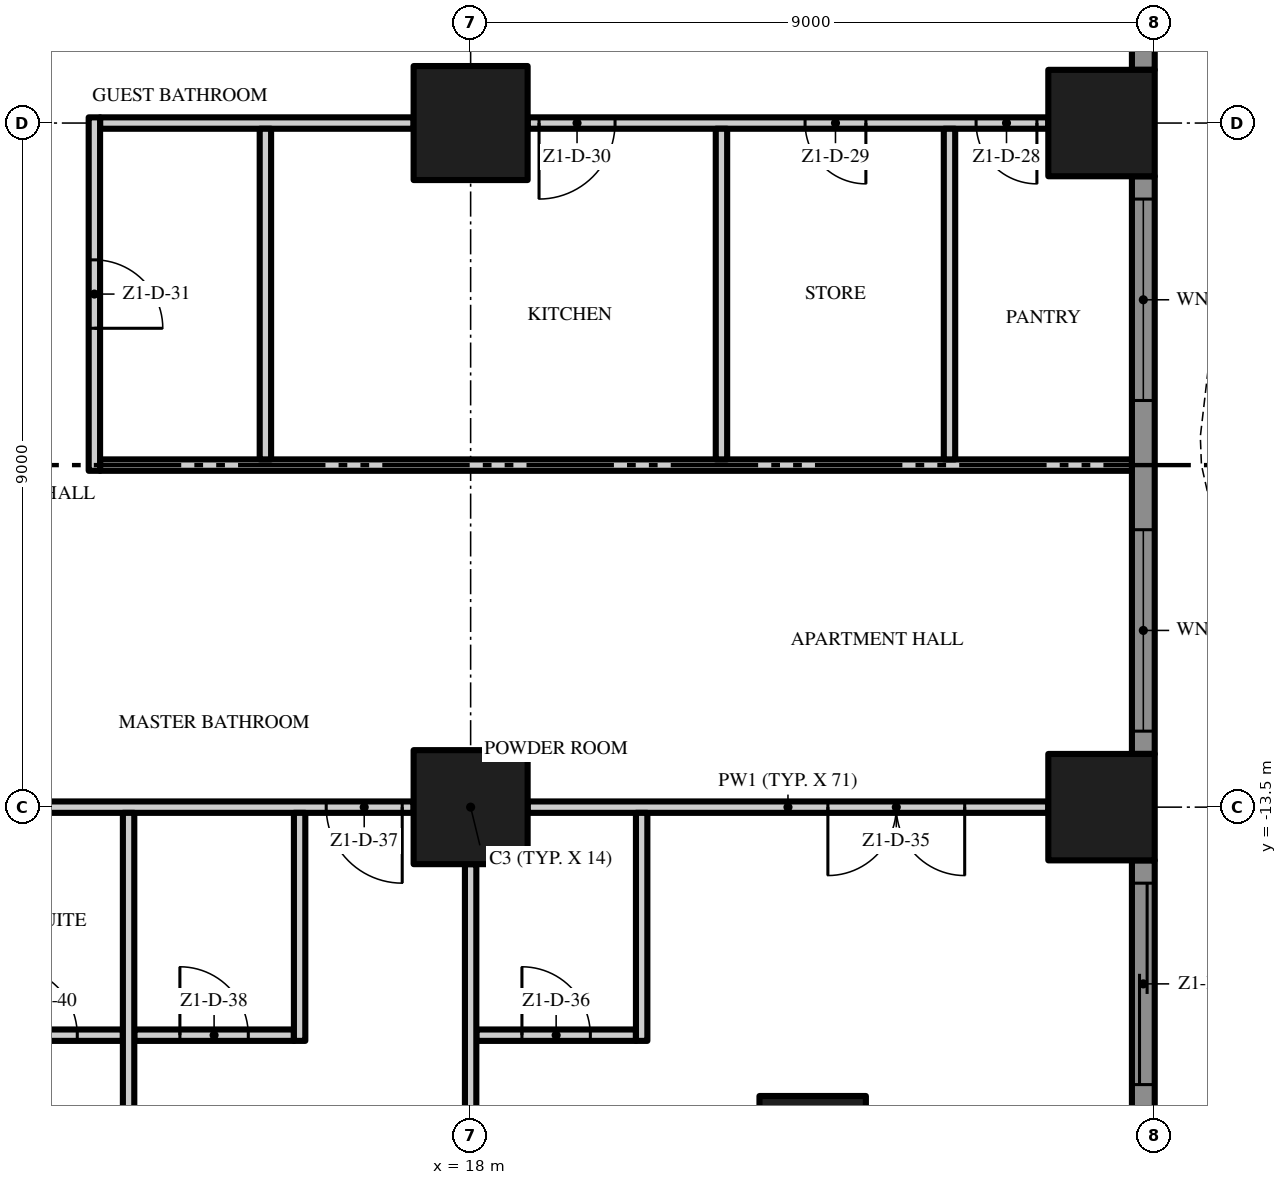
"""IFC4 building model, lengths in metres.
Left out: names, types, materials, properties, quantities, classifications, styles, units other than length and angle.
Written with IfcOpenShell. Run it as: python <this file> out.ifc"""

import sys

from ifc_helpers import new_model, si_unit, direction, frame, frame_2d, origin, origin_2d, place, context, subcontext, project, spatial, polyline, rectangle, outline, extrude, element, fill, save


model = new_model("IFC4")
c1 = context("Model", 3, precision=1e-05, world=origin(), true_north=direction((0.0, 1.0)))
c2 = subcontext(c1, "Body", "Model", "MODEL_VIEW")
j1 = project(units=[si_unit("LENGTHUNIT", "METRE"), si_unit("PLANEANGLEUNIT", "RADIAN")], contexts=[c1])
p1 = place(None, origin())
s1 = spatial("IfcSite", under=j1, at=p1, CompositionType="ELEMENT")
p2 = place(p1, origin())
s2 = spatial("IfcBuilding", under=s1, at=p2, CompositionType="ELEMENT")
p3 = place(p2, frame((0.0, 0.0, 49.2)))
s3 = spatial("IfcBuildingStorey", under=s2, at=p3, CompositionType="ELEMENT", Elevation=49.2)
for number, where, z_axis, x_axis in (
    (1, (18.0, -13.5, 0.0), (0.0, 0.0, 1.0), (1.0, 0.0, 0.0)),
    (2, (18.0, -4.5, 0.0), (0.0, 0.0, 1.0), (1.0, 0.0, 0.0)),
):
    element("IfcColumn", number, at=place(p3, frame(where, z_axis=z_axis, x_axis=x_axis)), inside=s3, PredefinedType="COLUMN", context=c2, shape_type="SweptSolid", body=[
        extrude(rectangle(XDim=1.5, YDim=1.5, at=origin_2d()), origin(), (0.0, 0.0, 1.0), 3.5),
    ])
for number, where, z_axis, x_axis in (
    (3, (26.3, -13.5, 0.0), (0.0, 0.0, 1.0), (1.0, 0.0, 0.0)),
    (4, (22.5, -18.0, 0.0), (0.0, 0.0, 1.0), (1.0, 0.0, 0.0)),
    (5, (26.3, -4.5, 0.0), (0.0, 0.0, 1.0), (1.0, 0.0, 0.0)),
):
    element("IfcColumn", number, at=place(p3, frame(where, z_axis=z_axis, x_axis=x_axis)), inside=s3, PredefinedType="COLUMN", context=c2, shape_type="SweptSolid", body=[
        extrude(rectangle(XDim=1.4, YDim=1.4, at=origin_2d()), origin(), (0.0, 0.0, 1.0), 3.5),
    ])
p4 = place(p3, frame((26.85, -14.2, 0.0), z_axis=(0.0, 0.0, 1.0), x_axis=(0.0, -1.0, 0.0)))
e6 = element("IfcWall", 6, at=p4, inside=s3, PredefinedType="SOLIDWALL", context=c2, shape_type="SweptSolid", body=[
    extrude(rectangle(XDim=3.5, YDim=0.3, at=frame_2d((1.75, 0.0))), origin(), (0.0, 0.0, 1.0), 3.5),
])
p5 = place(p4, frame((0.3, 0.0, 0.0)))
e7 = element("IfcOpeningElement", 7, at=p5, cuts=e6, PredefinedType="OPENING", context=c2, shape_type="SweptSolid", body=[
    extrude(rectangle(XDim=2.65, YDim=2.4, at=frame_2d((1.325, 1.2))), frame((0.0, 0.16, 0.0), z_axis=(0.0, -1.0, 0.0), x_axis=(1.0, 0.0, 0.0)), (0.0, 0.0, 1.0), 0.32),
])
p6 = place(p3, frame((26.85, -5.2, 0.0), z_axis=(0.0, 0.0, 1.0), x_axis=(0.0, -1.0, 0.0)))
e8 = element("IfcWall", 8, at=p6, inside=s3, PredefinedType="SOLIDWALL", context=c2, shape_type="SweptSolid", body=[
    extrude(rectangle(XDim=7.6, YDim=0.3, at=frame_2d((3.8, 0.0))), origin(), (0.0, 0.0, 1.0), 3.5),
])
p7 = place(p6, frame((4.65, 0.0, 0.45)))
e9 = element("IfcOpeningElement", 9, at=p7, cuts=e8, PredefinedType="OPENING", context=c2, shape_type="SweptSolid", body=[
    extrude(rectangle(XDim=2.65, YDim=2.65, at=frame_2d((1.325, 1.325))), frame((0.0, 0.16, 0.0), z_axis=(0.0, -1.0, 0.0), x_axis=(1.0, 0.0, 0.0)), (0.0, 0.0, 1.0), 0.32),
])
p8 = place(p6, frame((0.3, 0.0, 0.45)))
e10 = element("IfcOpeningElement", 10, at=p8, cuts=e8, PredefinedType="OPENING", context=c2, shape_type="SweptSolid", body=[
    extrude(rectangle(XDim=2.65, YDim=2.65, at=frame_2d((1.325, 1.325))), frame((0.0, 0.16, 0.0), z_axis=(0.0, -1.0, 0.0), x_axis=(1.0, 0.0, 0.0)), (0.0, 0.0, 1.0), 0.32),
])
p9 = place(p3, frame((26.85, 3.8, 0.0), z_axis=(0.0, 0.0, 1.0), x_axis=(0.0, -1.0, 0.0)))
e11 = element("IfcWall", 11, at=p9, inside=s3, PredefinedType="SOLIDWALL", context=c2, shape_type="SweptSolid", body=[
    extrude(rectangle(XDim=7.6, YDim=0.3, at=frame_2d((3.8, 0.0))), origin(), (0.0, 0.0, 1.0), 3.5),
])
p10 = place(p9, frame((4.65, 0.0, 0.0)))
e12 = element("IfcOpeningElement", 12, at=p10, cuts=e11, PredefinedType="OPENING", context=c2, shape_type="SweptSolid", body=[
    extrude(rectangle(XDim=2.65, YDim=2.4, at=frame_2d((1.325, 1.2))), frame((0.0, 0.16, 0.0), z_axis=(0.0, -1.0, 0.0), x_axis=(1.0, 0.0, 0.0)), (0.0, 0.0, 1.0), 0.32),
])
p11 = place(p9, frame((0.3, 0.0, 0.45)))
e13 = element("IfcOpeningElement", 13, at=p11, cuts=e11, PredefinedType="OPENING", context=c2, shape_type="SweptSolid", body=[
    extrude(rectangle(XDim=2.65, YDim=2.65, at=frame_2d((1.325, 1.325))), frame((0.0, 0.16, 0.0), z_axis=(0.0, -1.0, 0.0), x_axis=(1.0, 0.0, 0.0)), (0.0, 0.0, 1.0), 0.32),
])
p12 = place(p3, origin())
e14 = element("IfcWall", 14, at=p12, inside=s3, PredefinedType="USERDEFINED", context=c2, shape_type="SweptSolid", body=[
    extrude(outline(polyline([(29.649, -18.0), (29.985, -16.5), (30.0, -16.125), (29.869, -15.0), (29.345, -13.5), (28.612, -12.0), (27.951, -10.5), (27.615, -9.0), (27.6, -8.625), (27.731, -7.5), (28.255, -6.0), (28.988, -4.5), (29.649, -3.0), (29.985, -1.5), (30.0, -1.125), (29.869, 0.0), (29.345, 1.5), (28.612, 3.0), (27.951, 4.5), (27.615, 6.0), (27.6, 6.375), (27.731, 7.5), (28.255, 9.0), (28.988, 10.5), (29.649, 12.0), (29.985, 13.5), (30.0, 13.875), (29.869, 15.0), (29.345, 16.5), (28.612, 18.0), (28.388, 17.89), (29.114, 16.404), (29.624, 14.944), (29.749, 13.865), (29.736, 13.533), (29.41, 12.079), (28.761, 10.605), (28.024, 9.096), (27.486, 7.556), (27.349, 6.385), (27.366, 5.967), (27.713, 4.421), (28.385, 2.895), (29.114, 1.404), (29.624, -0.056), (29.749, -1.135), (29.736, -1.467), (29.41, -2.921), (28.761, -4.395), (28.024, -5.904), (27.486, -7.444), (27.349, -8.615), (27.366, -9.033), (27.713, -10.579), (28.385, -12.105), (29.114, -13.596), (29.624, -15.056), (29.749, -16.135), (29.736, -16.467), (29.405, -17.945), (29.649, -18.0)])), origin(), (0.0, 0.0, 1.0), 0.9),
])
p13 = place(p3, frame((11.325, -16.5, 0.0), z_axis=(0.0, 0.0, 1.0), x_axis=(1.0, 0.0, 0.0)))
e15 = element("IfcWall", 15, at=p13, inside=s3, PredefinedType="PARTITIONING", context=c2, shape_type="SweptSolid", body=[
    extrude(rectangle(XDim=2.1, YDim=0.15, at=frame_2d((1.05, 0.0))), origin(), (0.0, 0.0, 1.0), 3.5),
])
p14 = place(p13, frame((0.6, 0.0, 0.0)))
e16 = element("IfcOpeningElement", 16, at=p14, cuts=e15, PredefinedType="OPENING", context=c2, shape_type="SweptSolid", body=[
    extrude(rectangle(XDim=0.9, YDim=2.1, at=frame_2d((0.45, 1.05))), frame((0.0, 0.085, 0.0), z_axis=(0.0, -1.0, 0.0), x_axis=(1.0, 0.0, 0.0)), (0.0, 0.0, 1.0), 0.17),
])
p15 = place(p3, frame((13.575, -16.5, 0.0), z_axis=(0.0, 0.0, 1.0), x_axis=(1.0, 0.0, 0.0)))
e17 = element("IfcWall", 17, at=p15, inside=s3, PredefinedType="PARTITIONING", context=c2, shape_type="SweptSolid", body=[
    extrude(rectangle(XDim=2.1, YDim=0.15, at=frame_2d((1.05, 0.0))), origin(), (0.0, 0.0, 1.0), 3.5),
])
p16 = place(p15, frame((0.6, 0.0, 0.0)))
e18 = element("IfcOpeningElement", 18, at=p16, cuts=e17, PredefinedType="OPENING", context=c2, shape_type="SweptSolid", body=[
    extrude(rectangle(XDim=0.9, YDim=2.1, at=frame_2d((0.45, 1.05))), frame((0.0, 0.085, 0.0), z_axis=(0.0, -1.0, 0.0), x_axis=(1.0, 0.0, 0.0)), (0.0, 0.0, 1.0), 0.17),
])
p17 = place(p3, frame((18.075, -16.5, 0.0), z_axis=(0.0, 0.0, 1.0), x_axis=(1.0, 0.0, 0.0)))
e19 = element("IfcWall", 19, at=p17, inside=s3, PredefinedType="PARTITIONING", context=c2, shape_type="SweptSolid", body=[
    extrude(rectangle(XDim=2.1, YDim=0.15, at=frame_2d((1.05, 0.0))), origin(), (0.0, 0.0, 1.0), 3.5),
])
p18 = place(p17, frame((0.6, 0.0, 0.0)))
e20 = element("IfcOpeningElement", 20, at=p18, cuts=e19, PredefinedType="OPENING", context=c2, shape_type="SweptSolid", body=[
    extrude(rectangle(XDim=0.9, YDim=2.1, at=frame_2d((0.45, 1.05))), frame((0.0, 0.085, 0.0), z_axis=(0.0, -1.0, 0.0), x_axis=(1.0, 0.0, 0.0)), (0.0, 0.0, 1.0), 0.17),
])
p19 = place(p3, frame((17.25, -13.5, 0.0), z_axis=(0.0, 0.0, 1.0), x_axis=(-1.0, 0.0, 0.0)))
e21 = element("IfcWall", 21, at=p19, inside=s3, PredefinedType="PARTITIONING", context=c2, shape_type="SweptSolid", body=[
    extrude(rectangle(XDim=7.5, YDim=0.15, at=frame_2d((3.75, 0.0))), origin(), (0.0, 0.0, 1.0), 3.5),
])
p20 = place(p19, frame((0.15, 0.0, 0.0)))
e22 = element("IfcOpeningElement", 22, at=p20, cuts=e21, PredefinedType="OPENING", context=c2, shape_type="SweptSolid", body=[
    extrude(rectangle(XDim=1.0, YDim=2.4, at=frame_2d((0.5, 1.2))), frame((0.0, 0.085, 0.0), z_axis=(0.0, -1.0, 0.0), x_axis=(1.0, 0.0, 0.0)), (0.0, 0.0, 1.0), 0.17),
])
p21 = place(p19, frame((6.35, 0.0, 0.0)))
e23 = element("IfcOpeningElement", 23, at=p21, cuts=e21, PredefinedType="OPENING", context=c2, shape_type="SweptSolid", body=[
    extrude(rectangle(XDim=1.0, YDim=2.4, at=frame_2d((0.5, 1.2))), frame((0.0, 0.085, 0.0), z_axis=(0.0, -1.0, 0.0), x_axis=(1.0, 0.0, 0.0)), (0.0, 0.0, 1.0), 0.17),
])
p22 = place(p3, frame((25.6, -13.5, 0.0), z_axis=(0.0, 0.0, 1.0), x_axis=(-1.0, 0.0, 0.0)))
e24 = element("IfcWall", 24, at=p22, inside=s3, PredefinedType="PARTITIONING", context=c2, shape_type="SweptSolid", body=[
    extrude(rectangle(XDim=6.85, YDim=0.15, at=frame_2d((3.425, 0.0))), origin(), (0.0, 0.0, 1.0), 3.5),
])
p23 = place(p22, frame((1.1, 0.0, 0.0)))
e25 = element("IfcOpeningElement", 25, at=p23, cuts=e24, PredefinedType="OPENING", context=c2, shape_type="SweptSolid", body=[
    extrude(rectangle(XDim=1.8, YDim=2.4, at=frame_2d((0.9, 1.2))), frame((0.0, 0.085, 0.0), z_axis=(0.0, -1.0, 0.0), x_axis=(1.0, 0.0, 0.0)), (0.0, 0.0, 1.0), 0.17),
])
p24 = place(p3, frame((13.125, -9.0, 0.0), z_axis=(0.0, 0.0, 1.0), x_axis=(1.0, 0.0, 0.0)))
e26 = element("IfcWall", 26, at=p24, inside=s3, PredefinedType="PARTITIONING", context=c2, shape_type="SweptSolid", body=[
    extrude(rectangle(XDim=13.575, YDim=0.15, at=frame_2d((6.787, 0.0))), origin(), (0.0, 0.0, 1.0), 3.5),
])
p25 = place(p3, frame((13.125, -4.5, 0.0), z_axis=(0.0, 0.0, 1.0), x_axis=(1.0, 0.0, 0.0)))
e27 = element("IfcWall", 27, at=p25, inside=s3, PredefinedType="PARTITIONING", context=c2, shape_type="SweptSolid", body=[
    extrude(rectangle(XDim=4.125, YDim=0.15, at=frame_2d((2.062, 0.0))), origin(), (0.0, 0.0, 1.0), 3.5),
])
p26 = place(p3, frame((25.6, -4.5, 0.0), z_axis=(0.0, 0.0, 1.0), x_axis=(-1.0, 0.0, 0.0)))
e28 = element("IfcWall", 28, at=p26, inside=s3, PredefinedType="PARTITIONING", context=c2, shape_type="SweptSolid", body=[
    extrude(rectangle(XDim=6.85, YDim=0.15, at=frame_2d((3.425, 0.0))), origin(), (0.0, 0.0, 1.0), 3.5),
])
p27 = place(p26, frame((0.15, 0.0, 0.0)))
e29 = element("IfcOpeningElement", 29, at=p27, cuts=e28, PredefinedType="OPENING", context=c2, shape_type="SweptSolid", body=[
    extrude(rectangle(XDim=0.8, YDim=2.0, at=frame_2d((0.4, 1.0))), frame((0.0, 0.085, 0.0), z_axis=(0.0, -1.0, 0.0), x_axis=(1.0, 0.0, 0.0)), (0.0, 0.0, 1.0), 0.17),
])
p28 = place(p26, frame((2.4, 0.0, 0.0)))
e30 = element("IfcOpeningElement", 30, at=p28, cuts=e28, PredefinedType="OPENING", context=c2, shape_type="SweptSolid", body=[
    extrude(rectangle(XDim=0.8, YDim=2.0, at=frame_2d((0.4, 1.0))), frame((0.0, 0.085, 0.0), z_axis=(0.0, -1.0, 0.0), x_axis=(1.0, 0.0, 0.0)), (0.0, 0.0, 1.0), 0.17),
])
p29 = place(p26, frame((5.7, 0.0, 0.0)))
e31 = element("IfcOpeningElement", 31, at=p29, cuts=e28, PredefinedType="OPENING", context=c2, shape_type="SweptSolid", body=[
    extrude(rectangle(XDim=1.0, YDim=2.4, at=frame_2d((0.5, 1.2))), frame((0.0, 0.085, 0.0), z_axis=(0.0, -1.0, 0.0), x_axis=(1.0, 0.0, 0.0)), (0.0, 0.0, 1.0), 0.17),
])
p30 = place(p3, frame((13.05, -4.425, 0.0), z_axis=(0.0, 0.0, 1.0), x_axis=(0.0, -1.0, 0.0)))
e32 = element("IfcWall", 32, at=p30, inside=s3, PredefinedType="PARTITIONING", context=c2, shape_type="SweptSolid", body=[
    extrude(rectangle(XDim=4.65, YDim=0.15, at=frame_2d((2.325, 0.0))), origin(), (0.0, 0.0, 1.0), 3.5),
])
p31 = place(p30, frame((1.875, 0.0, 0.0)))
e33 = element("IfcOpeningElement", 33, at=p31, cuts=e32, PredefinedType="OPENING", context=c2, shape_type="SweptSolid", body=[
    extrude(rectangle(XDim=0.9, YDim=2.1, at=frame_2d((0.45, 1.05))), frame((0.0, 0.085, 0.0), z_axis=(0.0, -1.0, 0.0), x_axis=(1.0, 0.0, 0.0)), (0.0, 0.0, 1.0), 0.17),
])
p32 = place(p3, frame((13.5, -22.2, 0.0), z_axis=(0.0, 0.0, 1.0), x_axis=(0.0, 1.0, 0.0)))
e34 = element("IfcWall", 34, at=p32, inside=s3, PredefinedType="PARTITIONING", context=c2, shape_type="SweptSolid", body=[
    extrude(rectangle(XDim=8.625, YDim=0.15, at=frame_2d((4.312, 0.0))), origin(), (0.0, 0.0, 1.0), 3.5),
])
p33 = place(p3, frame((15.3, -8.925, 0.0), z_axis=(0.0, 0.0, 1.0), x_axis=(0.0, 1.0, 0.0)))
e35 = element("IfcWall", 35, at=p33, inside=s3, PredefinedType="PARTITIONING", context=c2, shape_type="SweptSolid", body=[
    extrude(rectangle(XDim=4.35, YDim=0.15, at=frame_2d((2.175, 0.0))), origin(), (0.0, 0.0, 1.0), 3.5),
])
p34 = place(p3, frame((15.75, -16.575, 0.0), z_axis=(0.0, 0.0, 1.0), x_axis=(0.0, 1.0, 0.0)))
e36 = element("IfcWall", 36, at=p34, inside=s3, PredefinedType="PARTITIONING", context=c2, shape_type="SweptSolid", body=[
    extrude(rectangle(XDim=3.0, YDim=0.15, at=frame_2d((1.5, 0.0))), origin(), (0.0, 0.0, 1.0), 3.5),
])
p35 = place(p3, frame((18.0, -21.1, 0.0), z_axis=(0.0, 0.0, 1.0), x_axis=(0.0, 1.0, 0.0)))
e37 = element("IfcWall", 37, at=p35, inside=s3, PredefinedType="PARTITIONING", context=c2, shape_type="SweptSolid", body=[
    extrude(rectangle(XDim=6.85, YDim=0.15, at=frame_2d((3.425, 0.0))), origin(), (0.0, 0.0, 1.0), 3.5),
])
p36 = place(p3, frame((20.25, -16.575, 0.0), z_axis=(0.0, 0.0, 1.0), x_axis=(0.0, 1.0, 0.0)))
e38 = element("IfcWall", 38, at=p36, inside=s3, PredefinedType="PARTITIONING", context=c2, shape_type="SweptSolid", body=[
    extrude(rectangle(XDim=3.0, YDim=0.15, at=frame_2d((1.5, 0.0))), origin(), (0.0, 0.0, 1.0), 3.5),
])
for number, where, z_axis, x_axis in (
    (39, (21.3, -8.925, 0.0), (0.0, 0.0, 1.0), (0.0, 1.0, 0.0)),
    (40, (24.3, -8.925, 0.0), (0.0, 0.0, 1.0), (0.0, 1.0, 0.0)),
):
    element("IfcWall", number, at=place(p3, frame(where, z_axis=z_axis, x_axis=x_axis)), inside=s3, PredefinedType="PARTITIONING", context=c2, shape_type="SweptSolid", body=[
        extrude(rectangle(XDim=4.35, YDim=0.15, at=frame_2d((2.175, 0.0))), origin(), (0.0, 0.0, 1.0), 3.5),
    ])
p37 = place(p5, origin())
e41 = element("IfcDoor", 41, at=p37, inside=s3, OperationType="SINGLE_SWING_LEFT", PredefinedType="DOOR", context=c2, shape_type="SweptSolid", body=[
    extrude(rectangle(XDim=2.65, YDim=2.4, at=frame_2d((1.325, 1.2))), frame((0.0, 0.025, 0.0), z_axis=(0.0, -1.0, 0.0), x_axis=(1.0, 0.0, 0.0)), (0.0, 0.0, 1.0), 0.05),
])
fill(e7, e41)
p38 = place(p7, origin())
e42 = element("IfcWindow", 42, at=p38, inside=s3, PartitioningType="SINGLE_PANEL", PredefinedType="WINDOW", context=c2, shape_type="SweptSolid", body=[
    extrude(rectangle(XDim=2.65, YDim=2.65, at=frame_2d((1.325, 1.325))), frame((0.0, 0.03, 0.0), z_axis=(0.0, -1.0, 0.0), x_axis=(1.0, 0.0, 0.0)), (0.0, 0.0, 1.0), 0.06),
])
fill(e9, e42)
p39 = place(p8, origin())
e43 = element("IfcWindow", 43, at=p39, inside=s3, PartitioningType="SINGLE_PANEL", PredefinedType="WINDOW", context=c2, shape_type="SweptSolid", body=[
    extrude(rectangle(XDim=2.65, YDim=2.65, at=frame_2d((1.325, 1.325))), frame((0.0, 0.03, 0.0), z_axis=(0.0, -1.0, 0.0), x_axis=(1.0, 0.0, 0.0)), (0.0, 0.0, 1.0), 0.06),
])
fill(e10, e43)
p40 = place(p27, origin())
e44 = element("IfcDoor", 44, at=p40, inside=s3, OperationType="SINGLE_SWING_LEFT", PredefinedType="DOOR", context=c2, shape_type="SweptSolid", body=[
    extrude(rectangle(XDim=0.8, YDim=2.0, at=frame_2d((0.4, 1.0))), frame((0.0, 0.025, 0.0), z_axis=(0.0, -1.0, 0.0), x_axis=(1.0, 0.0, 0.0)), (0.0, 0.0, 1.0), 0.05),
])
fill(e29, e44)
p41 = place(p28, origin())
e45 = element("IfcDoor", 45, at=p41, inside=s3, OperationType="SINGLE_SWING_LEFT", PredefinedType="DOOR", context=c2, shape_type="SweptSolid", body=[
    extrude(rectangle(XDim=0.8, YDim=2.0, at=frame_2d((0.4, 1.0))), frame((0.0, 0.025, 0.0), z_axis=(0.0, -1.0, 0.0), x_axis=(1.0, 0.0, 0.0)), (0.0, 0.0, 1.0), 0.05),
])
fill(e30, e45)
p42 = place(p29, origin())
e46 = element("IfcDoor", 46, at=p42, inside=s3, OperationType="SINGLE_SWING_RIGHT", PredefinedType="DOOR", context=c2, shape_type="SweptSolid", body=[
    extrude(rectangle(XDim=1.0, YDim=2.4, at=frame_2d((0.5, 1.2))), frame((0.0, 0.025, 0.0), z_axis=(0.0, -1.0, 0.0), x_axis=(1.0, 0.0, 0.0)), (0.0, 0.0, 1.0), 0.05),
])
fill(e31, e46)
p43 = place(p31, origin())
e47 = element("IfcDoor", 47, at=p43, inside=s3, OperationType="SINGLE_SWING_RIGHT", PredefinedType="DOOR", context=c2, shape_type="SweptSolid", body=[
    extrude(rectangle(XDim=0.9, YDim=2.1, at=frame_2d((0.45, 1.05))), frame((0.0, 0.025, 0.0), z_axis=(0.0, -1.0, 0.0), x_axis=(1.0, 0.0, 0.0)), (0.0, 0.0, 1.0), 0.05),
])
fill(e33, e47)
p44 = place(p23, origin())
e48 = element("IfcDoor", 48, at=p44, inside=s3, OperationType="DOUBLE_DOOR_SINGLE_SWING", PredefinedType="DOOR", context=c2, shape_type="SweptSolid", body=[
    extrude(rectangle(XDim=1.8, YDim=2.4, at=frame_2d((0.9, 1.2))), frame((0.0, 0.025, 0.0), z_axis=(0.0, -1.0, 0.0), x_axis=(1.0, 0.0, 0.0)), (0.0, 0.0, 1.0), 0.05),
])
fill(e25, e48)
p45 = place(p18, origin())
e49 = element("IfcDoor", 49, at=p45, inside=s3, OperationType="SINGLE_SWING_LEFT", PredefinedType="DOOR", context=c2, shape_type="SweptSolid", body=[
    extrude(rectangle(XDim=0.9, YDim=2.1, at=frame_2d((0.45, 1.05))), frame((0.0, 0.025, 0.0), z_axis=(0.0, -1.0, 0.0), x_axis=(1.0, 0.0, 0.0)), (0.0, 0.0, 1.0), 0.05),
])
fill(e20, e49)
p46 = place(p20, origin())
e50 = element("IfcDoor", 50, at=p46, inside=s3, OperationType="SINGLE_SWING_LEFT", PredefinedType="DOOR", context=c2, shape_type="SweptSolid", body=[
    extrude(rectangle(XDim=1.0, YDim=2.4, at=frame_2d((0.5, 1.2))), frame((0.0, 0.025, 0.0), z_axis=(0.0, -1.0, 0.0), x_axis=(1.0, 0.0, 0.0)), (0.0, 0.0, 1.0), 0.05),
])
fill(e22, e50)
p47 = place(p16, origin())
e51 = element("IfcDoor", 51, at=p47, inside=s3, OperationType="SINGLE_SWING_LEFT", PredefinedType="DOOR", context=c2, shape_type="SweptSolid", body=[
    extrude(rectangle(XDim=0.9, YDim=2.1, at=frame_2d((0.45, 1.05))), frame((0.0, 0.025, 0.0), z_axis=(0.0, -1.0, 0.0), x_axis=(1.0, 0.0, 0.0)), (0.0, 0.0, 1.0), 0.05),
])
fill(e18, e51)
p48 = place(p14, origin())
e52 = element("IfcDoor", 52, at=p48, inside=s3, OperationType="SINGLE_SWING_LEFT", PredefinedType="DOOR", context=c2, shape_type="SweptSolid", body=[
    extrude(rectangle(XDim=0.9, YDim=2.1, at=frame_2d((0.45, 1.05))), frame((0.0, 0.025, 0.0), z_axis=(0.0, -1.0, 0.0), x_axis=(1.0, 0.0, 0.0)), (0.0, 0.0, 1.0), 0.05),
])
fill(e16, e52)
save(model, sys.argv[1])
